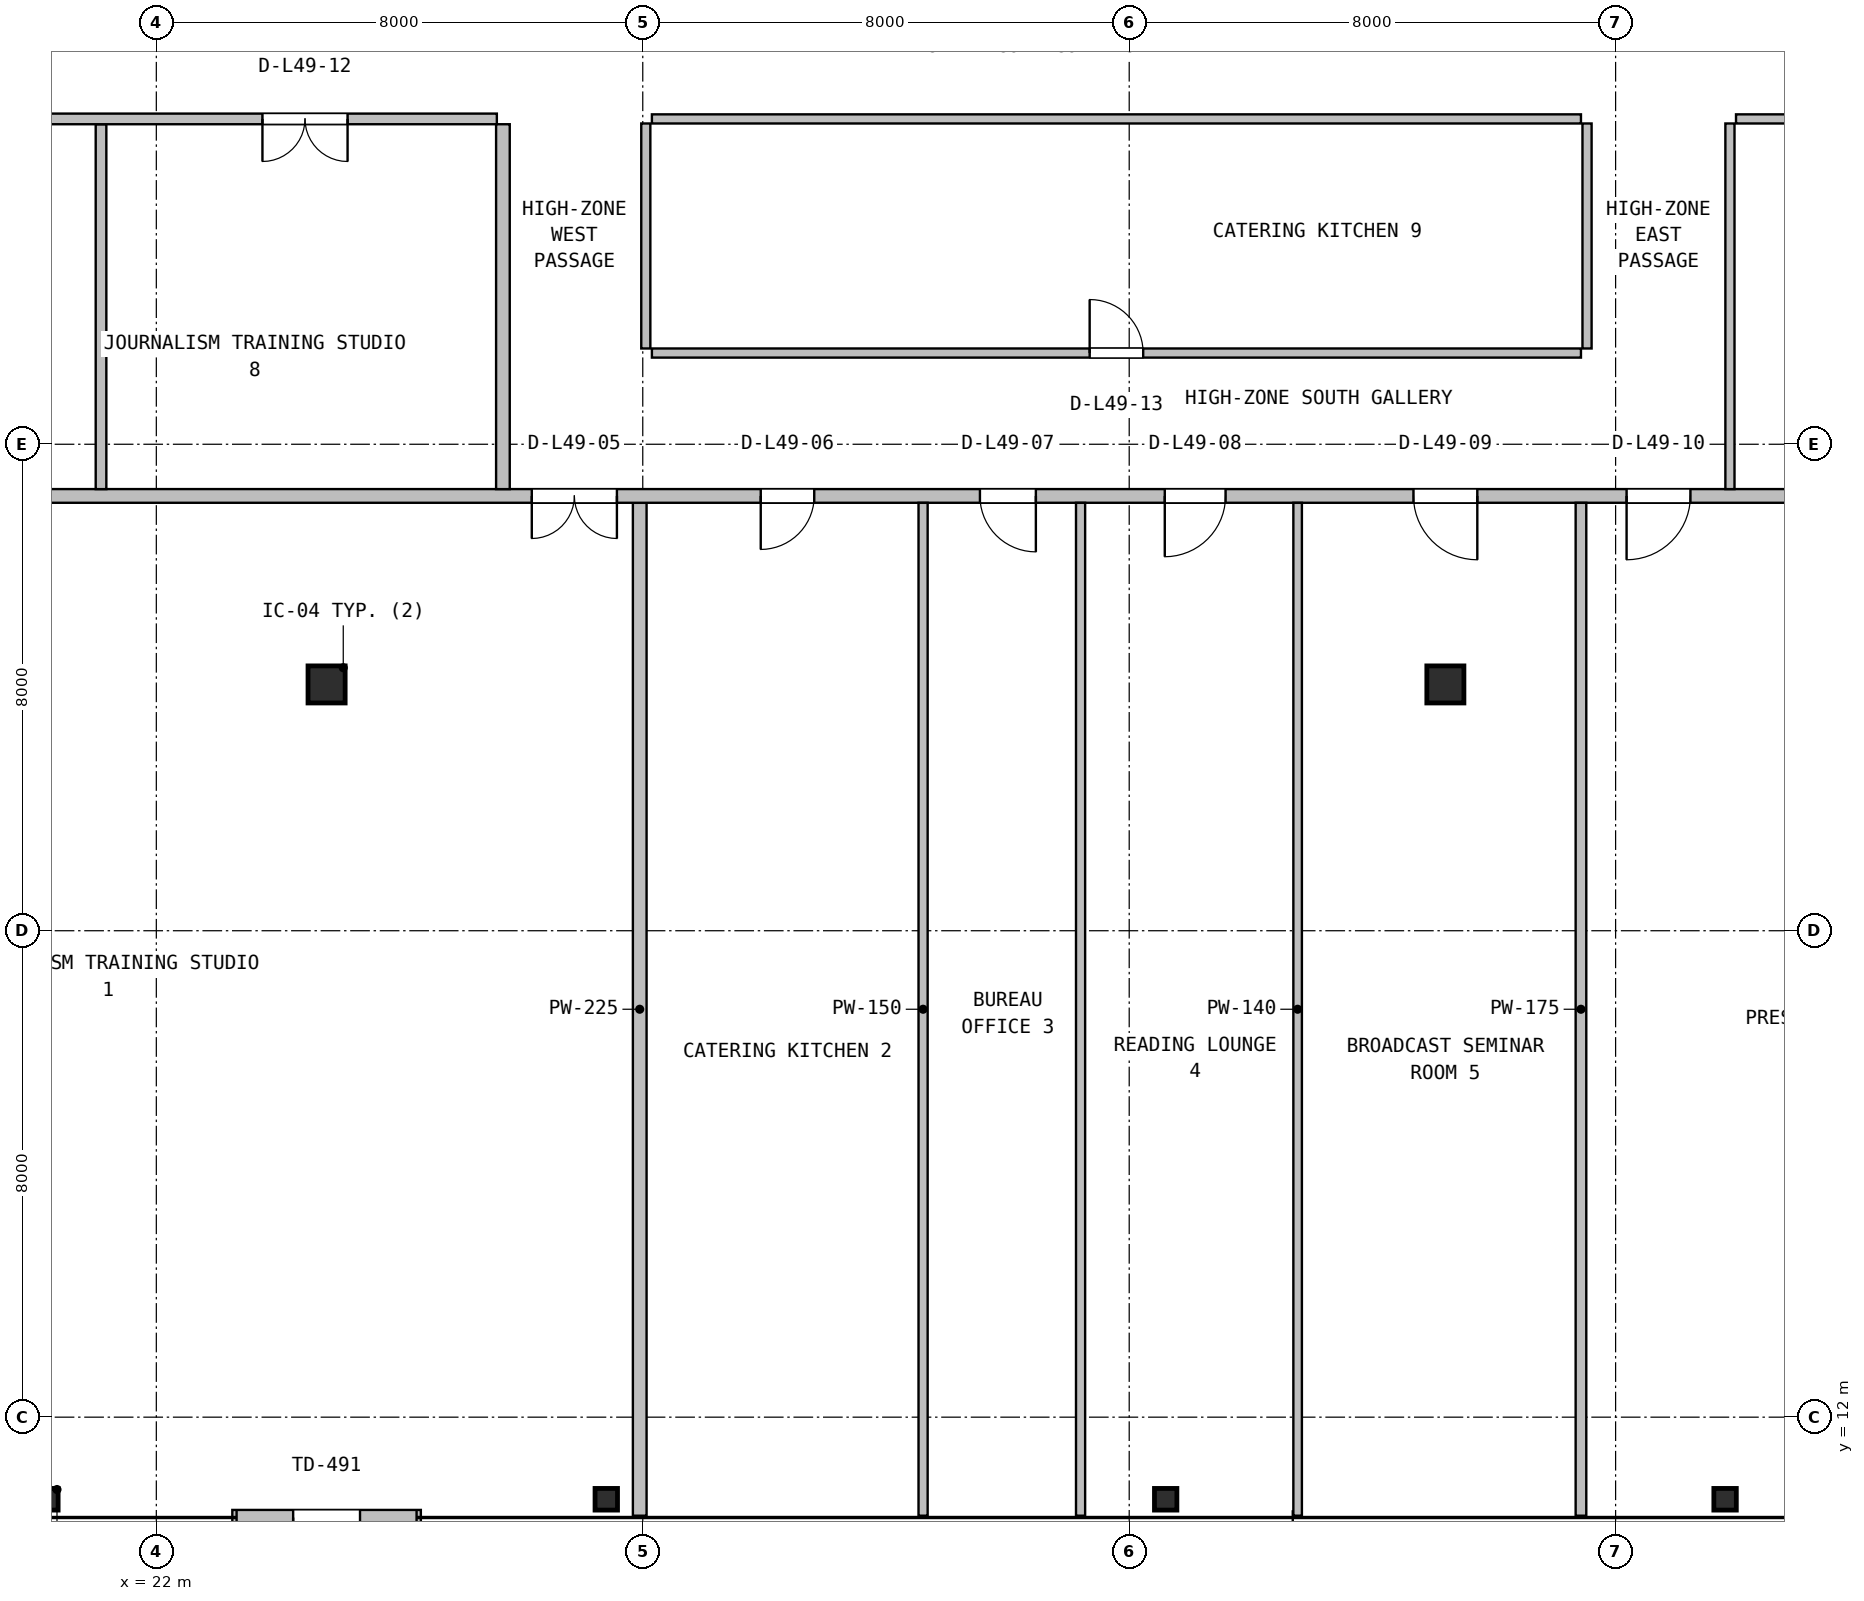
"""IFC4 building model, lengths in metres.
Left out: names, types, materials, properties, quantities, classifications, styles, units other than length and angle.
Written with IfcOpenShell. Run it as: python <this file> out.ifc"""

import sys

from ifc_helpers import new_model, si_unit, direction, frame, frame_2d, origin, origin_2d, place, context, subcontext, project, spatial, rectangle, hollow_circle, i_section, extrude, source, transform, mapped, element, fill, save


model = new_model("IFC4")
c1 = context("Model", 3, precision=1e-05, world=origin(), true_north=direction((0.0, 1.0)))
c2 = subcontext(c1, "Body", "Model", "MODEL_VIEW")
j1 = project(units=[si_unit("LENGTHUNIT", "METRE"), si_unit("PLANEANGLEUNIT", "RADIAN")], contexts=[c1])
p1 = place(None, origin())
s1 = spatial("IfcSite", under=j1, at=p1, CompositionType="ELEMENT")
p2 = place(p1, origin())
s2 = spatial("IfcBuilding", under=s1, at=p2, CompositionType="ELEMENT")
p3 = place(p2, frame((0.0, 0.0, 199.8)))
s3 = spatial("IfcBuildingStorey", under=s2, at=p3, CompositionType="ELEMENT", Elevation=199.8)
m1 = source(origin(), c2, "Body", "SweptSolid", [
    extrude(i_section(OverallWidth=0.369, OverallDepth=0.356, WebThickness=0.011, FlangeThickness=0.018, FilletRadius=0.016, at=origin_2d()), origin(), (0.0, 0.0, 1.0), 3.8),
])
for number, where, z_axis, x_axis in (
    (1, (20.2, 10.65, 0.0), (0.0, 0.0, 1.0), (1.0, 0.0, 0.0)),
    (2, (29.4, 10.65, 0.0), (0.0, 0.0, 1.0), (1.0, 0.0, 0.0)),
    (3, (38.6, 10.65, 0.0), (0.0, 0.0, 1.0), (1.0, 0.0, 0.0)),
    (4, (47.8, 10.65, 0.0), (0.0, 0.0, 1.0), (1.0, 0.0, 0.0)),
):
    element("IfcColumn", number, at=place(p3, frame(where, z_axis=z_axis, x_axis=x_axis)), inside=s3, PredefinedType="COLUMN", context=c2, shape_type="MappedRepresentation", body=[
        mapped(m1, transform((0.0, 0.0, 0.0), x_axis=(1.0, 0.0, 0.0), y_axis=(0.0, 1.0, 0.0), z_axis=(0.0, 0.0, 1.0), scale=1.0)),
    ])
m2 = source(origin(), c2, "Body", "SweptSolid", [
    extrude(hollow_circle(Radius=0.305, WallThickness=0.025, at=origin_2d()), origin(), (0.0, 0.0, 1.0), 3.8),
])
for number, where, z_axis, x_axis in (
    (5, (24.8, 24.05, 0.0), (0.0, 0.0, 1.0), (1.0, 0.0, 0.0)),
    (6, (43.2, 24.05, 0.0), (0.0, 0.0, 1.0), (1.0, 0.0, 0.0)),
):
    element("IfcColumn", number, at=place(p3, frame(where, z_axis=z_axis, x_axis=x_axis)), inside=s3, PredefinedType="COLUMN", context=c2, shape_type="MappedRepresentation", body=[
        mapped(m2, transform((0.0, 0.0, 0.0), x_axis=(1.0, 0.0, 0.0), y_axis=(0.0, 1.0, 0.0), z_axis=(0.0, 0.0, 1.0), scale=1.0)),
    ])
p4 = place(p3, frame((23.25, 10.35, 0.0), z_axis=(0.0, 0.0, 1.0), x_axis=(1.0, 0.0, 0.0)))
e7 = element("IfcWall", 7, at=p4, inside=s3, PredefinedType="SOLIDWALL", context=c2, shape_type="SweptSolid", body=[
    extrude(rectangle(XDim=3.1, YDim=0.25, at=frame_2d((1.55, 0.0))), origin(), (0.0, 0.0, 1.0), 3.53),
])
p5 = place(p4, frame((1.0, 0.0, 0.0)))
e8 = element("IfcOpeningElement", 8, at=p5, cuts=e7, PredefinedType="OPENING", context=c2, shape_type="SweptSolid", body=[
    extrude(rectangle(XDim=1.1, YDim=2.15, at=frame_2d((0.55, 1.075))), frame((0.0, 0.135, 0.0), z_axis=(0.0, -1.0, 0.0), x_axis=(1.0, 0.0, 0.0)), (0.0, 0.0, 1.0), 0.27),
])
p6 = place(p3, frame((29.95, 10.38, 0.0), z_axis=(0.0, 0.0, 1.0), x_axis=(0.0, 1.0, 0.0)))
e9 = element("IfcWall", 9, at=p6, inside=s3, PredefinedType="PARTITIONING", context=c2, shape_type="SweptSolid", body=[
    extrude(rectangle(XDim=16.657, YDim=0.225, at=frame_2d((8.329, 0.0))), origin(), (0.0, 0.0, 1.0), 2.908),
])
p7 = place(p3, frame((9.68, 27.15, 0.0), z_axis=(0.0, 0.0, 1.0), x_axis=(1.0, 0.0, 0.0)))
e10 = element("IfcWall", 10, at=p7, inside=s3, PredefinedType="PARTITIONING", context=c2, shape_type="SweptSolid", body=[
    extrude(rectangle(XDim=48.64, YDim=0.225, at=frame_2d((24.32, 0.0))), origin(), (0.0, 0.0, 1.0), 2.908),
])
p8 = place(p7, frame((18.495, 0.0, 0.0)))
e11 = element("IfcOpeningElement", 11, at=p8, cuts=e10, PredefinedType="OPENING", context=c2, shape_type="SweptSolid", body=[
    extrude(rectangle(XDim=1.4, YDim=2.12, at=frame_2d((0.7, 1.06))), frame((0.0, 0.123, 0.0), z_axis=(0.0, -1.0, 0.0), x_axis=(1.0, 0.0, 0.0)), (0.0, 0.0, 1.0), 0.245),
])
p9 = place(p7, frame((22.26, 0.0, 0.0)))
e12 = element("IfcOpeningElement", 12, at=p9, cuts=e10, PredefinedType="OPENING", context=c2, shape_type="SweptSolid", body=[
    extrude(rectangle(XDim=0.88, YDim=2.06, at=frame_2d((0.44, 1.03))), frame((0.0, 0.123, 0.0), z_axis=(0.0, -1.0, 0.0), x_axis=(1.0, 0.0, 0.0)), (0.0, 0.0, 1.0), 0.245),
])
p10 = place(p7, frame((25.865, 0.0, 0.0)))
e13 = element("IfcOpeningElement", 13, at=p10, cuts=e10, PredefinedType="OPENING", context=c2, shape_type="SweptSolid", body=[
    extrude(rectangle(XDim=0.92, YDim=2.08, at=frame_2d((0.46, 1.04))), frame((0.0, 0.123, 0.0), z_axis=(0.0, -1.0, 0.0), x_axis=(1.0, 0.0, 0.0)), (0.0, 0.0, 1.0), 0.245),
])
p11 = place(p7, frame((28.905, 0.0, 0.0)))
e14 = element("IfcOpeningElement", 14, at=p11, cuts=e10, PredefinedType="OPENING", context=c2, shape_type="SweptSolid", body=[
    extrude(rectangle(XDim=1.0, YDim=2.1, at=frame_2d((0.5, 1.05))), frame((0.0, 0.123, 0.0), z_axis=(0.0, -1.0, 0.0), x_axis=(1.0, 0.0, 0.0)), (0.0, 0.0, 1.0), 0.245),
])
p12 = place(p7, frame((32.995, 0.0, 0.0)))
e15 = element("IfcOpeningElement", 15, at=p12, cuts=e10, PredefinedType="OPENING", context=c2, shape_type="SweptSolid", body=[
    extrude(rectangle(XDim=1.05, YDim=2.1, at=frame_2d((0.525, 1.05))), frame((0.0, 0.123, 0.0), z_axis=(0.0, -1.0, 0.0), x_axis=(1.0, 0.0, 0.0)), (0.0, 0.0, 1.0), 0.245),
])
p13 = place(p7, frame((36.5, 0.0, 0.0)))
e16 = element("IfcOpeningElement", 16, at=p13, cuts=e10, PredefinedType="OPENING", context=c2, shape_type="SweptSolid", body=[
    extrude(rectangle(XDim=1.05, YDim=2.1, at=frame_2d((0.525, 1.05))), frame((0.0, 0.123, 0.0), z_axis=(0.0, -1.0, 0.0), x_axis=(1.0, 0.0, 0.0)), (0.0, 0.0, 1.0), 0.245),
])
for number, where, z_axis, x_axis in (
    (17, (34.61, 10.38, 0.0), (0.0, 0.0, 1.0), (0.0, 1.0, 0.0)),
    (18, (37.2, 10.38, 0.0), (0.0, 0.0, 1.0), (0.0, 1.0, 0.0)),
):
    element("IfcWall", number, at=place(p3, frame(where, z_axis=z_axis, x_axis=x_axis)), inside=s3, PredefinedType="PARTITIONING", context=c2, shape_type="SweptSolid", body=[
        extrude(rectangle(XDim=16.657, YDim=0.15, at=frame_2d((8.329, 0.0))), origin(), (0.0, 0.0, 1.0), 2.908),
    ])
p14 = place(p3, frame((40.77, 10.38, 0.0), z_axis=(0.0, 0.0, 1.0), x_axis=(0.0, 1.0, 0.0)))
e19 = element("IfcWall", 19, at=p14, inside=s3, PredefinedType="PARTITIONING", context=c2, shape_type="SweptSolid", body=[
    extrude(rectangle(XDim=16.657, YDim=0.14, at=frame_2d((8.329, 0.0))), origin(), (0.0, 0.0, 1.0), 2.908),
])
p15 = place(p3, frame((45.43, 10.38, 0.0), z_axis=(0.0, 0.0, 1.0), x_axis=(0.0, 1.0, 0.0)))
e20 = element("IfcWall", 20, at=p15, inside=s3, PredefinedType="PARTITIONING", context=c2, shape_type="SweptSolid", body=[
    extrude(rectangle(XDim=16.657, YDim=0.175, at=frame_2d((8.329, 0.0))), origin(), (0.0, 0.0, 1.0), 2.908),
])
p16 = place(p3, frame((21.09, 27.262, 0.0), z_axis=(0.0, 0.0, 1.0), x_axis=(0.0, 1.0, 0.0)))
e21 = element("IfcWall", 21, at=p16, inside=s3, PredefinedType="PARTITIONING", context=c2, shape_type="SweptSolid", body=[
    extrude(rectangle(XDim=6.001, YDim=0.175, at=frame_2d((3.0, 0.0))), origin(), (0.0, 0.0, 1.0), 3.222),
])
p17 = place(p3, frame((9.68, 33.35, 0.0), z_axis=(0.0, 0.0, 1.0), x_axis=(1.0, 0.0, 0.0)))
e22 = element("IfcWall", 22, at=p17, inside=s3, PredefinedType="PARTITIONING", context=c2, shape_type="SweptSolid", body=[
    extrude(rectangle(XDim=17.92, YDim=0.175, at=frame_2d((8.96, 0.0))), origin(), (0.0, 0.0, 1.0), 2.908),
])
p18 = place(p17, frame((7.015, 0.0, 0.0)))
e23 = element("IfcOpeningElement", 23, at=p18, cuts=e22, PredefinedType="OPENING", context=c2, shape_type="SweptSolid", body=[
    extrude(rectangle(XDim=1.05, YDim=2.1, at=frame_2d((0.525, 1.05))), frame((0.0, 0.098, 0.0), z_axis=(0.0, -1.0, 0.0), x_axis=(1.0, 0.0, 0.0)), (0.0, 0.0, 1.0), 0.195),
])
p19 = place(p17, frame((14.065, 0.0, 0.0)))
e24 = element("IfcOpeningElement", 24, at=p19, cuts=e22, PredefinedType="OPENING", context=c2, shape_type="SweptSolid", body=[
    extrude(rectangle(XDim=1.4, YDim=2.12, at=frame_2d((0.7, 1.06))), frame((0.0, 0.098, 0.0), z_axis=(0.0, -1.0, 0.0), x_axis=(1.0, 0.0, 0.0)), (0.0, 0.0, 1.0), 0.195),
])
p20 = place(p3, frame((27.7, 27.262, 0.0), z_axis=(0.0, 0.0, 1.0), x_axis=(0.0, 1.0, 0.0)))
e25 = element("IfcWall", 25, at=p20, inside=s3, PredefinedType="PARTITIONING", context=c2, shape_type="SweptSolid", body=[
    extrude(rectangle(XDim=6.001, YDim=0.225, at=frame_2d((3.0, 0.0))), origin(), (0.0, 0.0, 1.0), 3.222),
])
p21 = place(p3, frame((30.15, 29.5, 0.0), z_axis=(0.0, 0.0, 1.0), x_axis=(1.0, 0.0, 0.0)))
e26 = element("IfcWall", 26, at=p21, inside=s3, PredefinedType="PARTITIONING", context=c2, shape_type="SweptSolid", body=[
    extrude(rectangle(XDim=15.28, YDim=0.15, at=frame_2d((7.64, 0.0))), origin(), (0.0, 0.0, 1.0), 2.908),
])
p22 = place(p21, frame((7.2, 0.0, 0.0)))
e27 = element("IfcOpeningElement", 27, at=p22, cuts=e26, PredefinedType="OPENING", context=c2, shape_type="SweptSolid", body=[
    extrude(rectangle(XDim=0.88, YDim=2.06, at=frame_2d((0.44, 1.03))), frame((0.0, 0.085, 0.0), z_axis=(0.0, -1.0, 0.0), x_axis=(1.0, 0.0, 0.0)), (0.0, 0.0, 1.0), 0.17),
])
p23 = place(p3, frame((45.53, 29.575, 0.0), z_axis=(0.0, 0.0, 1.0), x_axis=(0.0, 1.0, 0.0)))
e28 = element("IfcWall", 28, at=p23, inside=s3, PredefinedType="PARTITIONING", context=c2, shape_type="SweptSolid", body=[
    extrude(rectangle(XDim=3.7, YDim=0.15, at=frame_2d((1.85, 0.0))), origin(), (0.0, 0.0, 1.0), 3.53),
])
p24 = place(p3, frame((30.15, 33.35, 0.0), z_axis=(0.0, 0.0, 1.0), x_axis=(1.0, 0.0, 0.0)))
e29 = element("IfcWall", 29, at=p24, inside=s3, PredefinedType="PARTITIONING", context=c2, shape_type="SweptSolid", body=[
    extrude(rectangle(XDim=15.28, YDim=0.15, at=frame_2d((7.64, 0.0))), origin(), (0.0, 0.0, 1.0), 2.908),
])
p25 = place(p3, frame((30.05, 29.575, 0.0), z_axis=(0.0, 0.0, 1.0), x_axis=(0.0, 1.0, 0.0)))
e30 = element("IfcWall", 30, at=p25, inside=s3, PredefinedType="PARTITIONING", context=c2, shape_type="SweptSolid", body=[
    extrude(rectangle(XDim=3.7, YDim=0.15, at=frame_2d((1.85, 0.0))), origin(), (0.0, 0.0, 1.0), 3.53),
])
p26 = place(p3, frame((47.98, 33.35, 0.0), z_axis=(0.0, 0.0, 1.0), x_axis=(1.0, 0.0, 0.0)))
e31 = element("IfcWall", 31, at=p26, inside=s3, PredefinedType="PARTITIONING", context=c2, shape_type="SweptSolid", body=[
    extrude(rectangle(XDim=10.34, YDim=0.15, at=frame_2d((5.17, 0.0))), origin(), (0.0, 0.0, 1.0), 3.171),
])
p27 = place(p26, frame((2.875, 0.0, 0.0)))
e32 = element("IfcOpeningElement", 32, at=p27, cuts=e31, PredefinedType="OPENING", context=c2, shape_type="SweptSolid", body=[
    extrude(rectangle(XDim=0.92, YDim=2.08, at=frame_2d((0.46, 1.04))), frame((0.0, 0.085, 0.0), z_axis=(0.0, -1.0, 0.0), x_axis=(1.0, 0.0, 0.0)), (0.0, 0.0, 1.0), 0.17),
])
p28 = place(p3, frame((47.88, 27.262, 0.0), z_axis=(0.0, 0.0, 1.0), x_axis=(0.0, 1.0, 0.0)))
e33 = element("IfcWall", 33, at=p28, inside=s3, PredefinedType="PARTITIONING", context=c2, shape_type="SweptSolid", body=[
    extrude(rectangle(XDim=6.013, YDim=0.15, at=frame_2d((3.006, 0.0))), origin(), (0.0, 0.0, 1.0), 3.222),
])
m3 = source(origin(), c2, "Body", "SweptSolid", [
    extrude(rectangle(XDim=1.1, YDim=2.15, at=frame_2d((0.55, 1.075))), frame((0.0, 0.025, 0.0), z_axis=(0.0, -1.0, 0.0), x_axis=(1.0, 0.0, 0.0)), (0.0, 0.0, 1.0), 0.05),
])
p29 = place(p5, frame((1.1, 0.0, 0.0), z_axis=(0.0, 0.0, 1.0), x_axis=(-1.0, 0.0, 0.0)))
e34 = element("IfcDoor", 34, at=p29, inside=s3, OperationType="SINGLE_SWING_LEFT", PredefinedType="DOOR", context=c2, shape_type="MappedRepresentation", body=[
    mapped(m3, transform((0.0, 0.0, 0.0), x_axis=(1.0, 0.0, 0.0), y_axis=(0.0, 1.0, 0.0), z_axis=(0.0, 0.0, 1.0), scale=1.0)),
])
fill(e8, e34)
m4 = source(origin(), c2, "Body", "SweptSolid", [
    extrude(rectangle(XDim=1.4, YDim=2.12, at=frame_2d((0.7, 1.06))), frame((0.0, 0.025, 0.0), z_axis=(0.0, -1.0, 0.0), x_axis=(1.0, 0.0, 0.0)), (0.0, 0.0, 1.0), 0.05),
])
p30 = place(p8, frame((1.4, 0.0, 0.0), z_axis=(0.0, 0.0, 1.0), x_axis=(-1.0, 0.0, 0.0)))
e35 = element("IfcDoor", 35, at=p30, inside=s3, OperationType="DOUBLE_DOOR_SINGLE_SWING", PredefinedType="DOOR", context=c2, shape_type="MappedRepresentation", body=[
    mapped(m4, transform((0.0, 0.0, 0.0), x_axis=(1.0, 0.0, 0.0), y_axis=(0.0, 1.0, 0.0), z_axis=(0.0, 0.0, 1.0), scale=1.0)),
])
fill(e11, e35)
m5 = source(origin(), c2, "Body", "SweptSolid", [
    extrude(rectangle(XDim=0.88, YDim=2.06, at=frame_2d((0.44, 1.03))), frame((0.0, 0.025, 0.0), z_axis=(0.0, -1.0, 0.0), x_axis=(1.0, 0.0, 0.0)), (0.0, 0.0, 1.0), 0.05),
])
p31 = place(p9, frame((0.88, 0.0, 0.0), z_axis=(0.0, 0.0, 1.0), x_axis=(-1.0, 0.0, 0.0)))
e36 = element("IfcDoor", 36, at=p31, inside=s3, OperationType="SINGLE_SWING_LEFT", PredefinedType="DOOR", context=c2, shape_type="MappedRepresentation", body=[
    mapped(m5, transform((0.0, 0.0, 0.0), x_axis=(1.0, 0.0, 0.0), y_axis=(0.0, 1.0, 0.0), z_axis=(0.0, 0.0, 1.0), scale=1.0)),
])
fill(e12, e36)
m6 = source(origin(), c2, "Body", "SweptSolid", [
    extrude(rectangle(XDim=0.92, YDim=2.08, at=frame_2d((0.46, 1.04))), frame((0.0, 0.025, 0.0), z_axis=(0.0, -1.0, 0.0), x_axis=(1.0, 0.0, 0.0)), (0.0, 0.0, 1.0), 0.05),
])
p32 = place(p10, frame((0.92, 0.0, 0.0), z_axis=(0.0, 0.0, 1.0), x_axis=(-1.0, 0.0, 0.0)))
e37 = element("IfcDoor", 37, at=p32, inside=s3, OperationType="SINGLE_SWING_RIGHT", PredefinedType="DOOR", context=c2, shape_type="MappedRepresentation", body=[
    mapped(m6, transform((0.0, 0.0, 0.0), x_axis=(1.0, 0.0, 0.0), y_axis=(0.0, 1.0, 0.0), z_axis=(0.0, 0.0, 1.0), scale=1.0)),
])
fill(e13, e37)
m7 = source(origin(), c2, "Body", "SweptSolid", [
    extrude(rectangle(XDim=1.0, YDim=2.1, at=frame_2d((0.5, 1.05))), frame((0.0, 0.025, 0.0), z_axis=(0.0, -1.0, 0.0), x_axis=(1.0, 0.0, 0.0)), (0.0, 0.0, 1.0), 0.05),
])
p33 = place(p11, frame((1.0, 0.0, 0.0), z_axis=(0.0, 0.0, 1.0), x_axis=(-1.0, 0.0, 0.0)))
e38 = element("IfcDoor", 38, at=p33, inside=s3, OperationType="SINGLE_SWING_LEFT", PredefinedType="DOOR", context=c2, shape_type="MappedRepresentation", body=[
    mapped(m7, transform((0.0, 0.0, 0.0), x_axis=(1.0, 0.0, 0.0), y_axis=(0.0, 1.0, 0.0), z_axis=(0.0, 0.0, 1.0), scale=1.0)),
])
fill(e14, e38)
m8 = source(origin(), c2, "Body", "SweptSolid", [
    extrude(rectangle(XDim=1.05, YDim=2.1, at=frame_2d((0.525, 1.05))), frame((0.0, 0.025, 0.0), z_axis=(0.0, -1.0, 0.0), x_axis=(1.0, 0.0, 0.0)), (0.0, 0.0, 1.0), 0.05),
])
p34 = place(p12, frame((1.05, 0.0, 0.0), z_axis=(0.0, 0.0, 1.0), x_axis=(-1.0, 0.0, 0.0)))
e39 = element("IfcDoor", 39, at=p34, inside=s3, OperationType="SINGLE_SWING_RIGHT", PredefinedType="DOOR", context=c2, shape_type="MappedRepresentation", body=[
    mapped(m8, transform((0.0, 0.0, 0.0), x_axis=(1.0, 0.0, 0.0), y_axis=(0.0, 1.0, 0.0), z_axis=(0.0, 0.0, 1.0), scale=1.0)),
])
fill(e15, e39)
p35 = place(p13, frame((1.05, 0.0, 0.0), z_axis=(0.0, 0.0, 1.0), x_axis=(-1.0, 0.0, 0.0)))
e40 = element("IfcDoor", 40, at=p35, inside=s3, OperationType="SINGLE_SWING_LEFT", PredefinedType="DOOR", context=c2, shape_type="MappedRepresentation", body=[
    mapped(m8, transform((0.0, 0.0, 0.0), x_axis=(1.0, 0.0, 0.0), y_axis=(0.0, 1.0, 0.0), z_axis=(0.0, 0.0, 1.0), scale=1.0)),
])
fill(e16, e40)
p36 = place(p19, frame((1.4, 0.0, 0.0), z_axis=(0.0, 0.0, 1.0), x_axis=(-1.0, 0.0, 0.0)))
e41 = element("IfcDoor", 41, at=p36, inside=s3, OperationType="DOUBLE_DOOR_SINGLE_SWING", PredefinedType="DOOR", context=c2, shape_type="MappedRepresentation", body=[
    mapped(m4, transform((0.0, 0.0, 0.0), x_axis=(1.0, 0.0, 0.0), y_axis=(0.0, 1.0, 0.0), z_axis=(0.0, 0.0, 1.0), scale=1.0)),
])
fill(e24, e41)
p37 = place(p22, origin())
e42 = element("IfcDoor", 42, at=p37, inside=s3, OperationType="SINGLE_SWING_LEFT", PredefinedType="DOOR", context=c2, shape_type="MappedRepresentation", body=[
    mapped(m5, transform((0.0, 0.0, 0.0), x_axis=(1.0, 0.0, 0.0), y_axis=(0.0, 1.0, 0.0), z_axis=(0.0, 0.0, 1.0), scale=1.0)),
])
fill(e27, e42)
save(model, sys.argv[1])
